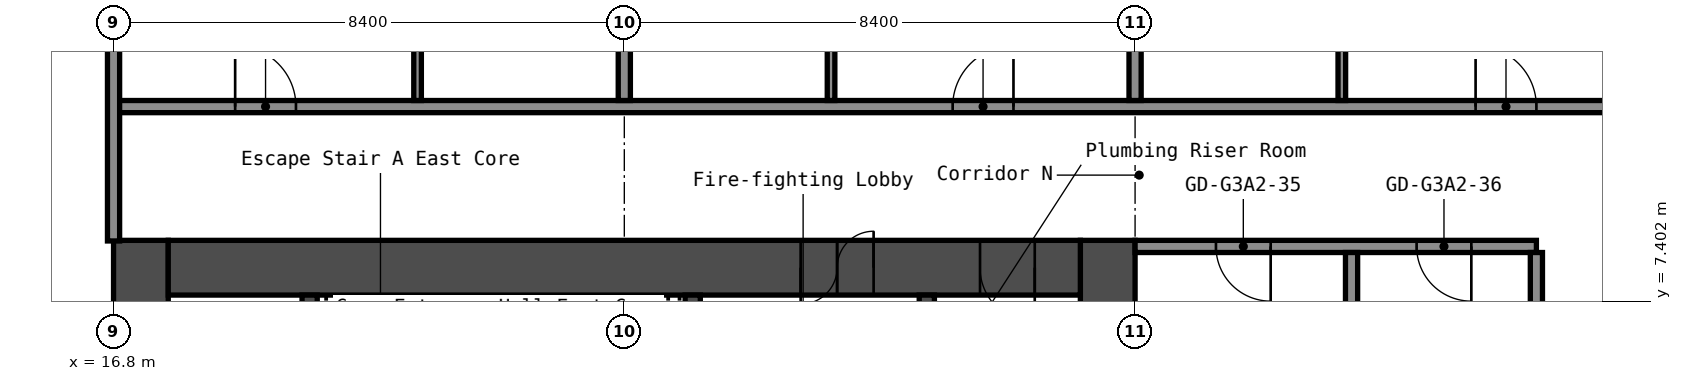
"""IFC4 building model, lengths in metres.
Left out: names, types, materials, properties, quantities, classifications, styles, units other than length and angle.
Written with IfcOpenShell. Run it as: python <this file> out.ifc"""

import sys

from ifc_helpers import new_model, si_unit, direction, frame, frame_2d, origin, place, context, subcontext, project, spatial, rectangle, extrude, element, fill, save


model = new_model("IFC4")
c1 = context("Model", 3, precision=1e-05, world=origin(), true_north=direction((0.0, 1.0)))
c2 = subcontext(c1, "Body", "Model", "MODEL_VIEW")
j1 = project(units=[si_unit("LENGTHUNIT", "METRE"), si_unit("PLANEANGLEUNIT", "RADIAN")], contexts=[c1])
p1 = place(None, origin())
s1 = spatial("IfcSite", under=j1, at=p1, CompositionType="ELEMENT")
p2 = place(p1, origin())
s2 = spatial("IfcBuilding", under=s1, at=p2, CompositionType="ELEMENT")
p3 = place(p2, frame((0.0, 0.0, 163.0)))
s3 = spatial("IfcBuildingStorey", under=s2, at=p3, CompositionType="ELEMENT", Elevation=163.0)
p4 = place(p3, frame((17.25, -8.4, 0.0), z_axis=(0.0, 0.0, 1.0), x_axis=(0.0, 1.0, 0.0)))
e1 = element("IfcWall", 1, at=p4, inside=s3, PredefinedType="SHEAR", context=c2, shape_type="SweptSolid", body=[
    extrude(rectangle(XDim=16.8, YDim=0.9, at=frame_2d((8.4, 0.0))), origin(), (0.0, 0.0, 1.0), 2.75),
])
p5 = place(p4, frame((7.1, 0.0, 0.0)))
e2 = element("IfcOpeningElement", 2, at=p5, cuts=e1, PredefinedType="OPENING", context=c2, shape_type="SweptSolid", body=[
    extrude(rectangle(XDim=1.6, YDim=2.1, at=frame_2d((0.8, 1.05))), frame((0.0, 0.46, 0.0), z_axis=(0.0, -1.0, 0.0), x_axis=(1.0, 0.0, 0.0)), (0.0, 0.0, 1.0), 0.92),
])
p6 = place(p3, frame((33.15, -8.4, 0.0), z_axis=(0.0, 0.0, 1.0), x_axis=(0.0, 1.0, 0.0)))
e3 = element("IfcWall", 3, at=p6, inside=s3, PredefinedType="SHEAR", context=c2, shape_type="SweptSolid", body=[
    extrude(rectangle(XDim=16.8, YDim=0.9, at=frame_2d((8.4, 0.0))), origin(), (0.0, 0.0, 1.0), 2.75),
])
p7 = place(p3, frame((17.7, 7.95, 0.0), z_axis=(0.0, 0.0, 1.0), x_axis=(1.0, 0.0, 0.0)))
e4 = element("IfcWall", 4, at=p7, inside=s3, PredefinedType="SHEAR", context=c2, shape_type="SweptSolid", body=[
    extrude(rectangle(XDim=15.0, YDim=0.9, at=frame_2d((7.5, 0.0))), origin(), (0.0, 0.0, 1.0), 2.75),
])
p8 = place(p7, frame((10.4, 0.0, 0.0)))
e5 = element("IfcOpeningElement", 5, at=p8, cuts=e4, PredefinedType="OPENING", context=c2, shape_type="SweptSolid", body=[
    extrude(rectangle(XDim=1.2, YDim=2.1, at=frame_2d((0.6, 1.05))), frame((0.0, 0.46, 0.0), z_axis=(0.0, -1.0, 0.0), x_axis=(1.0, 0.0, 0.0)), (0.0, 0.0, 1.0), 0.92),
])
p9 = place(p7, frame((13.35, 0.0, 0.0)))
e6 = element("IfcOpeningElement", 6, at=p9, cuts=e4, PredefinedType="OPENING", context=c2, shape_type="SweptSolid", body=[
    extrude(rectangle(XDim=0.9, YDim=2.1, at=frame_2d((0.45, 1.05))), frame((0.0, 0.46, 0.0), z_axis=(0.0, -1.0, 0.0), x_axis=(1.0, 0.0, 0.0)), (0.0, 0.0, 1.0), 0.92),
])
p10 = place(p3, frame((20.025, 1.2, 0.0), z_axis=(0.0, 0.0, 1.0), x_axis=(0.0, 1.0, 0.0)))
e7 = element("IfcWall", 7, at=p10, inside=s3, PredefinedType="SHEAR", context=c2, shape_type="SweptSolid", body=[
    extrude(rectangle(XDim=6.3, YDim=0.25, at=frame_2d((3.15, 0.0))), origin(), (0.0, 0.0, 1.0), 2.75),
])
p11 = place(p3, frame((26.325, 3.75, 0.0), z_axis=(0.0, 0.0, 1.0), x_axis=(0.0, 1.0, 0.0)))
e8 = element("IfcWall", 8, at=p11, inside=s3, PredefinedType="SHEAR", context=c2, shape_type="SweptSolid", body=[
    extrude(rectangle(XDim=3.75, YDim=0.25, at=frame_2d((1.875, 0.0))), origin(), (0.0, 0.0, 1.0), 2.75),
])
p12 = place(p11, frame((1.25, 0.0, 0.0)))
e9 = element("IfcOpeningElement", 9, at=p12, cuts=e8, PredefinedType="OPENING", context=c2, shape_type="SweptSolid", body=[
    extrude(rectangle(XDim=1.2, YDim=2.1, at=frame_2d((0.6, 1.05))), frame((0.0, 0.135, 0.0), z_axis=(0.0, -1.0, 0.0), x_axis=(1.0, 0.0, 0.0)), (0.0, 0.0, 1.0), 0.27),
])
p13 = place(p3, frame((30.175, 1.45, 0.0), z_axis=(0.0, 0.0, 1.0), x_axis=(0.0, 1.0, 0.0)))
e10 = element("IfcWall", 10, at=p13, inside=s3, PredefinedType="SHEAR", context=c2, shape_type="SweptSolid", body=[
    extrude(rectangle(XDim=6.05, YDim=0.25, at=frame_2d((3.025, 0.0))), origin(), (0.0, 0.0, 1.0), 2.75),
])
p14 = place(p13, frame((2.625, 0.0, 0.0)))
e11 = element("IfcOpeningElement", 11, at=p14, cuts=e10, PredefinedType="OPENING", context=c2, shape_type="SweptSolid", body=[
    extrude(rectangle(XDim=1.1, YDim=2.1, at=frame_2d((0.55, 1.05))), frame((0.0, 0.135, 0.0), z_axis=(0.0, -1.0, 0.0), x_axis=(1.0, 0.0, 0.0)), (0.0, 0.0, 1.0), 0.27),
])
p15 = place(p3, frame((33.6, 8.3, 0.0), z_axis=(0.0, 0.0, 1.0), x_axis=(1.0, 0.0, 0.0)))
e12 = element("IfcWall", 12, at=p15, inside=s3, PredefinedType="PARTITIONING", context=c2, shape_type="SweptSolid", body=[
    extrude(rectangle(XDim=6.6, YDim=0.2, at=frame_2d((3.3, 0.0))), origin(), (0.0, 0.0, 1.0), 2.75),
])
p16 = place(p15, frame((1.33, 0.0, 0.0)))
e13 = element("IfcOpeningElement", 13, at=p16, cuts=e12, PredefinedType="OPENING", context=c2, shape_type="SweptSolid", body=[
    extrude(rectangle(XDim=0.9, YDim=2.1, at=frame_2d((0.45, 1.05))), frame((0.0, 0.11, 0.0), z_axis=(0.0, -1.0, 0.0), x_axis=(1.0, 0.0, 0.0)), (0.0, 0.0, 1.0), 0.22),
])
p17 = place(p15, frame((4.63, 0.0, 0.0)))
e14 = element("IfcOpeningElement", 14, at=p17, cuts=e12, PredefinedType="OPENING", context=c2, shape_type="SweptSolid", body=[
    extrude(rectangle(XDim=0.9, YDim=2.1, at=frame_2d((0.45, 1.05))), frame((0.0, 0.11, 0.0), z_axis=(0.0, -1.0, 0.0), x_axis=(1.0, 0.0, 0.0)), (0.0, 0.0, 1.0), 0.22),
])
p18 = place(p3, frame((16.8, 10.6, 0.0), z_axis=(0.0, 0.0, 1.0), x_axis=(1.0, 0.0, 0.0)))
e15 = element("IfcWall", 15, at=p18, inside=s3, PredefinedType="PARTITIONING", context=c2, shape_type="SweptSolid", body=[
    extrude(rectangle(XDim=25.9, YDim=0.2, at=frame_2d((12.95, 0.0))), origin(), (0.0, 0.0, 1.0), 2.75),
])
p19 = place(p18, frame((2.0, 0.0, 0.0)))
e16 = element("IfcOpeningElement", 16, at=p19, cuts=e15, PredefinedType="OPENING", context=c2, shape_type="SweptSolid", body=[
    extrude(rectangle(XDim=1.0, YDim=2.1, at=frame_2d((0.5, 1.05))), frame((0.0, 0.11, 0.0), z_axis=(0.0, -1.0, 0.0), x_axis=(1.0, 0.0, 0.0)), (0.0, 0.0, 1.0), 0.22),
])
p20 = place(p18, frame((13.8, 0.0, 0.0)))
e17 = element("IfcOpeningElement", 17, at=p20, cuts=e15, PredefinedType="OPENING", context=c2, shape_type="SweptSolid", body=[
    extrude(rectangle(XDim=1.0, YDim=2.1, at=frame_2d((0.5, 1.05))), frame((0.0, 0.11, 0.0), z_axis=(0.0, -1.0, 0.0), x_axis=(1.0, 0.0, 0.0)), (0.0, 0.0, 1.0), 0.22),
])
p21 = place(p18, frame((22.4, 0.0, 0.0)))
e18 = element("IfcOpeningElement", 18, at=p21, cuts=e15, PredefinedType="OPENING", context=c2, shape_type="SweptSolid", body=[
    extrude(rectangle(XDim=1.0, YDim=2.1, at=frame_2d((0.5, 1.05))), frame((0.0, 0.11, 0.0), z_axis=(0.0, -1.0, 0.0), x_axis=(1.0, 0.0, 0.0)), (0.0, 0.0, 1.0), 0.22),
])
p22 = place(p3, frame((16.8, 8.39, 0.0), z_axis=(0.0, 0.0, 1.0), x_axis=(0.0, 1.0, 0.0)))
e19 = element("IfcWall", 19, at=p22, inside=s3, PredefinedType="PARTITIONING", context=c2, shape_type="SweptSolid", body=[
    extrude(rectangle(XDim=9.91, YDim=0.2, at=frame_2d((4.955, 0.0))), origin(), (0.0, 0.0, 1.0), 2.75),
])
p23 = place(p3, frame((21.8, 10.7, 0.0), z_axis=(0.0, 0.0, 1.0), x_axis=(0.0, 1.0, 0.0)))
e20 = element("IfcWall", 20, at=p23, inside=s3, PredefinedType="PARTITIONING", context=c2, shape_type="SweptSolid", body=[
    extrude(rectangle(XDim=3.3, YDim=0.125, at=frame_2d((1.65, 0.0))), origin(), (0.0, 0.0, 1.0), 2.75),
])
p24 = place(p3, frame((25.2, 10.7, 0.0), z_axis=(0.0, 0.0, 1.0), x_axis=(0.0, 1.0, 0.0)))
e21 = element("IfcWall", 21, at=p24, inside=s3, PredefinedType="PARTITIONING", context=c2, shape_type="SweptSolid", body=[
    extrude(rectangle(XDim=7.6, YDim=0.2, at=frame_2d((3.8, 0.0))), origin(), (0.0, 0.0, 1.0), 2.75),
])
p25 = place(p3, frame((28.6, 10.7, 0.0), z_axis=(0.0, 0.0, 1.0), x_axis=(0.0, 1.0, 0.0)))
e22 = element("IfcWall", 22, at=p25, inside=s3, PredefinedType="PARTITIONING", context=c2, shape_type="SweptSolid", body=[
    extrude(rectangle(XDim=3.3, YDim=0.125, at=frame_2d((1.65, 0.0))), origin(), (0.0, 0.0, 1.0), 2.75),
])
p26 = place(p3, frame((33.6, 10.7, 0.0), z_axis=(0.0, 0.0, 1.0), x_axis=(0.0, 1.0, 0.0)))
e23 = element("IfcWall", 23, at=p26, inside=s3, PredefinedType="PARTITIONING", context=c2, shape_type="SweptSolid", body=[
    extrude(rectangle(XDim=7.6, YDim=0.2, at=frame_2d((3.8, 0.0))), origin(), (0.0, 0.0, 1.0), 2.75),
])
p27 = place(p3, frame((37.0, 10.7, 0.0), z_axis=(0.0, 0.0, 1.0), x_axis=(0.0, 1.0, 0.0)))
e24 = element("IfcWall", 24, at=p27, inside=s3, PredefinedType="PARTITIONING", context=c2, shape_type="SweptSolid", body=[
    extrude(rectangle(XDim=3.3, YDim=0.125, at=frame_2d((1.65, 0.0))), origin(), (0.0, 0.0, 1.0), 2.75),
])
p28 = place(p3, frame((37.16, 0.0, 0.0), z_axis=(0.0, 0.0, 1.0), x_axis=(0.0, 1.0, 0.0)))
e25 = element("IfcWall", 25, at=p28, inside=s3, PredefinedType="PARTITIONING", context=c2, shape_type="SweptSolid", body=[
    extrude(rectangle(XDim=8.2, YDim=0.2, at=frame_2d((4.1, 0.0))), origin(), (0.0, 0.0, 1.0), 2.75),
])
p29 = place(p3, frame((40.2, -8.2, 0.0), z_axis=(0.0, 0.0, 1.0), x_axis=(0.0, 1.0, 0.0)))
e26 = element("IfcWall", 26, at=p29, inside=s3, PredefinedType="PARTITIONING", context=c2, shape_type="SweptSolid", body=[
    extrude(rectangle(XDim=16.4, YDim=0.2, at=frame_2d((8.2, 0.0))), origin(), (0.0, 0.0, 1.0), 2.75),
])
p30 = place(p8, origin())
e27 = element("IfcDoor", 27, at=p30, inside=s3, OperationType="DOUBLE_DOOR_SINGLE_SWING", PredefinedType="DOOR", context=c2, shape_type="SweptSolid", body=[
    extrude(rectangle(XDim=1.2, YDim=2.1, at=frame_2d((0.6, 1.05))), frame((0.0, 0.025, 0.0), z_axis=(0.0, -1.0, 0.0), x_axis=(1.0, 0.0, 0.0)), (0.0, 0.0, 1.0), 0.05),
])
fill(e5, e27)
p31 = place(p9, origin())
e28 = element("IfcDoor", 28, at=p31, inside=s3, OperationType="SINGLE_SWING_RIGHT", PredefinedType="DOOR", context=c2, shape_type="SweptSolid", body=[
    extrude(rectangle(XDim=0.9, YDim=2.1, at=frame_2d((0.45, 1.05))), frame((0.0, 0.025, 0.0), z_axis=(0.0, -1.0, 0.0), x_axis=(1.0, 0.0, 0.0)), (0.0, 0.0, 1.0), 0.05),
])
fill(e6, e28)
p32 = place(p16, origin())
e29 = element("IfcDoor", 29, at=p32, inside=s3, OperationType="SINGLE_SWING_RIGHT", PredefinedType="DOOR", context=c2, shape_type="SweptSolid", body=[
    extrude(rectangle(XDim=0.9, YDim=2.1, at=frame_2d((0.45, 1.05))), frame((0.0, 0.025, 0.0), z_axis=(0.0, -1.0, 0.0), x_axis=(1.0, 0.0, 0.0)), (0.0, 0.0, 1.0), 0.05),
])
fill(e13, e29)
p33 = place(p17, origin())
e30 = element("IfcDoor", 30, at=p33, inside=s3, OperationType="SINGLE_SWING_RIGHT", PredefinedType="DOOR", context=c2, shape_type="SweptSolid", body=[
    extrude(rectangle(XDim=0.9, YDim=2.1, at=frame_2d((0.45, 1.05))), frame((0.0, 0.025, 0.0), z_axis=(0.0, -1.0, 0.0), x_axis=(1.0, 0.0, 0.0)), (0.0, 0.0, 1.0), 0.05),
])
fill(e14, e30)
p34 = place(p19, origin())
e31 = element("IfcDoor", 31, at=p34, inside=s3, OperationType="SINGLE_SWING_RIGHT", PredefinedType="DOOR", context=c2, shape_type="SweptSolid", body=[
    extrude(rectangle(XDim=1.0, YDim=2.1, at=frame_2d((0.5, 1.05))), frame((0.0, 0.025, 0.0), z_axis=(0.0, -1.0, 0.0), x_axis=(1.0, 0.0, 0.0)), (0.0, 0.0, 1.0), 0.05),
])
fill(e16, e31)
p35 = place(p20, origin())
e32 = element("IfcDoor", 32, at=p35, inside=s3, OperationType="SINGLE_SWING_LEFT", PredefinedType="DOOR", context=c2, shape_type="SweptSolid", body=[
    extrude(rectangle(XDim=1.0, YDim=2.1, at=frame_2d((0.5, 1.05))), frame((0.0, 0.025, 0.0), z_axis=(0.0, -1.0, 0.0), x_axis=(1.0, 0.0, 0.0)), (0.0, 0.0, 1.0), 0.05),
])
fill(e17, e32)
p36 = place(p21, origin())
e33 = element("IfcDoor", 33, at=p36, inside=s3, OperationType="SINGLE_SWING_RIGHT", PredefinedType="DOOR", context=c2, shape_type="SweptSolid", body=[
    extrude(rectangle(XDim=1.0, YDim=2.1, at=frame_2d((0.5, 1.05))), frame((0.0, 0.025, 0.0), z_axis=(0.0, -1.0, 0.0), x_axis=(1.0, 0.0, 0.0)), (0.0, 0.0, 1.0), 0.05),
])
fill(e18, e33)
save(model, sys.argv[1])
